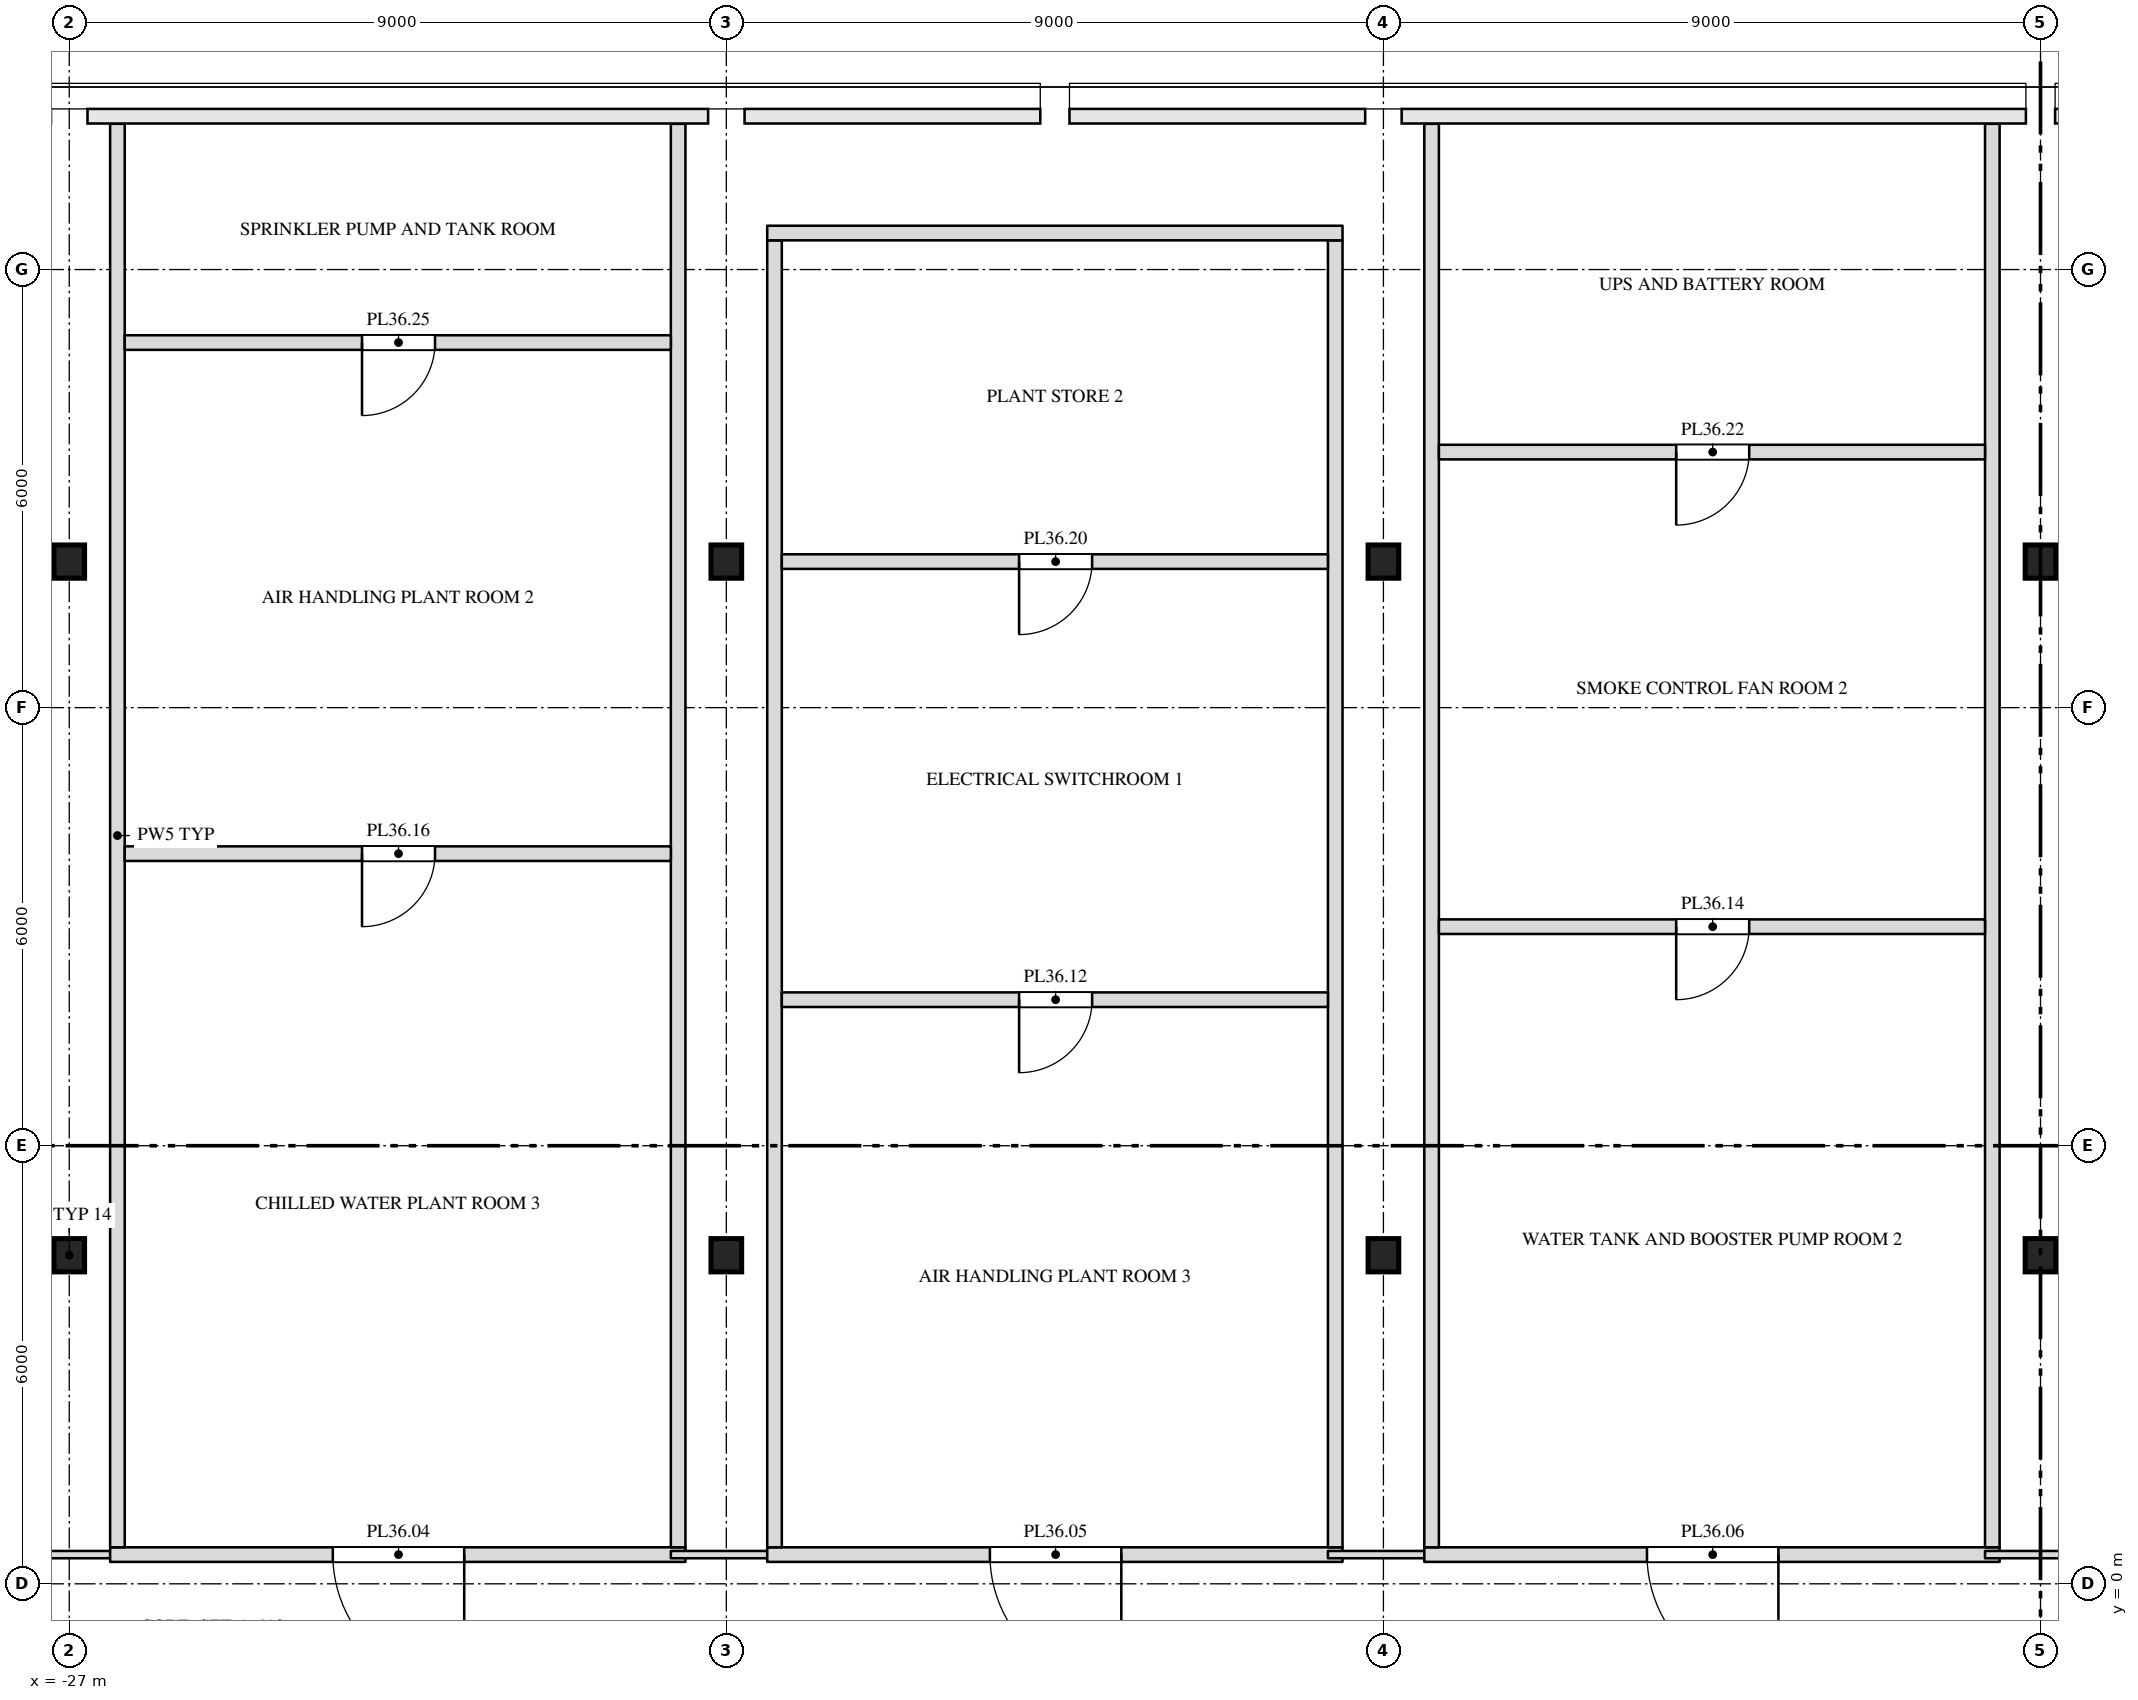
"""IFC4 building model, lengths in metres.
Left out: names, types, materials, properties, quantities, classifications, styles, units other than length and angle.
Written with IfcOpenShell. Run it as: python <this file> out.ifc"""

import sys

from ifc_helpers import new_model, si_unit, direction, frame, frame_2d, origin, origin_2d, place, context, subcontext, project, spatial, rectangle, i_section, extrude, element, fill, save


model = new_model("IFC4")
c1 = context("Model", 3, precision=1e-05, world=origin(), true_north=direction((0.0, 1.0)))
c2 = subcontext(c1, "Body", "Model", "MODEL_VIEW")
j1 = project(units=[si_unit("LENGTHUNIT", "METRE"), si_unit("PLANEANGLEUNIT", "RADIAN")], contexts=[c1])
p1 = place(None, origin())
s1 = spatial("IfcSite", under=j1, at=p1, CompositionType="ELEMENT")
p2 = place(p1, origin())
s2 = spatial("IfcBuilding", under=s1, at=p2, CompositionType="ELEMENT")
p3 = place(p2, frame((0.0, 0.0, 160.5)))
s3 = spatial("IfcBuildingStorey", under=s2, at=p3, CompositionType="ELEMENT", Elevation=160.5)
for number, where, z_axis, x_axis in (
    (1, (-27.0, 4.5, 0.0), (0.0, 0.0, 1.0), (1.0, 0.0, 0.0)),
    (2, (-18.0, 4.5, 0.0), (0.0, 0.0, 1.0), (1.0, 0.0, 0.0)),
    (3, (-9.0, 4.5, 0.0), (0.0, 0.0, 1.0), (1.0, 0.0, 0.0)),
    (4, (0.0, 4.5, 0.0), (0.0, 0.0, 1.0), (1.0, 0.0, 0.0)),
    (5, (-27.0, 14.0, 0.0), (0.0, 0.0, 1.0), (1.0, 0.0, 0.0)),
    (6, (-18.0, 14.0, 0.0), (0.0, 0.0, 1.0), (1.0, 0.0, 0.0)),
    (7, (-9.0, 14.0, 0.0), (0.0, 0.0, 1.0), (1.0, 0.0, 0.0)),
    (8, (0.0, 14.0, 0.0), (0.0, 0.0, 1.0), (1.0, 0.0, 0.0)),
):
    element("IfcColumn", number, at=place(p3, frame(where, z_axis=z_axis, x_axis=x_axis)), inside=s3, PredefinedType="COLUMN", context=c2, shape_type="SweptSolid", body=[
        extrude(i_section(OverallWidth=0.419, OverallDepth=0.455, WebThickness=0.042, FlangeThickness=0.068, at=origin_2d()), origin(), (0.0, 0.0, 1.0), 4.0),
    ])
p4 = place(p3, frame((-27.675, 0.4, 0.0), z_axis=(0.0, 0.0, 1.0), x_axis=(1.0, 0.0, 0.0)))
e9 = element("IfcWall", 9, at=p4, inside=s3, PredefinedType="PARTITIONING", context=c2, shape_type="SweptSolid", body=[
    extrude(rectangle(XDim=1.435, YDim=0.1, at=frame_2d((0.718, 0.0))), origin(), (0.0, 0.0, 1.0), 3.8),
])
p5 = place(p3, frame((-26.44, 0.4, 0.0), z_axis=(0.0, 0.0, 1.0), x_axis=(1.0, 0.0, 0.0)))
e10 = element("IfcWall", 10, at=p5, inside=s3, PredefinedType="PARTITIONING", context=c2, shape_type="SweptSolid", body=[
    extrude(rectangle(XDim=7.88, YDim=0.2, at=frame_2d((3.94, 0.0))), origin(), (0.0, 0.0, 1.0), 3.8),
])
p6 = place(p5, frame((3.05, 0.0, 0.0)))
e11 = element("IfcOpeningElement", 11, at=p6, cuts=e10, PredefinedType="OPENING", context=c2, shape_type="SweptSolid", body=[
    extrude(rectangle(XDim=1.8, YDim=2.1, at=frame_2d((0.9, 1.05))), frame((0.0, 0.112, 0.0), z_axis=(0.0, -1.0, 0.0), x_axis=(1.0, 0.0, 0.0)), (0.0, 0.0, 1.0), 0.224),
])
p7 = place(p3, frame((-26.34, 0.5, 0.0), z_axis=(0.0, 0.0, 1.0), x_axis=(0.0, 1.0, 0.0)))
e12 = element("IfcWall", 12, at=p7, inside=s3, PredefinedType="PARTITIONING", context=c2, shape_type="SweptSolid", body=[
    extrude(rectangle(XDim=19.496, YDim=0.2, at=frame_2d((9.748, 0.0))), origin(), (0.0, 0.0, 1.0), 3.8),
])
p8 = place(p3, frame((-18.76, 0.4, 0.0), z_axis=(0.0, 0.0, 1.0), x_axis=(1.0, 0.0, 0.0)))
e13 = element("IfcWall", 13, at=p8, inside=s3, PredefinedType="PARTITIONING", context=c2, shape_type="SweptSolid", body=[
    extrude(rectangle(XDim=1.52, YDim=0.1, at=frame_2d((0.76, 0.0))), origin(), (0.0, 0.0, 1.0), 3.8),
])
p9 = place(p3, frame((-18.66, 0.5, 0.0), z_axis=(0.0, 0.0, 1.0), x_axis=(0.0, 1.0, 0.0)))
e14 = element("IfcWall", 14, at=p9, inside=s3, PredefinedType="PARTITIONING", context=c2, shape_type="SweptSolid", body=[
    extrude(rectangle(XDim=19.496, YDim=0.2, at=frame_2d((9.748, 0.0))), origin(), (0.0, 0.0, 1.0), 3.8),
])
p10 = place(p3, frame((-17.44, 0.4, 0.0), z_axis=(0.0, 0.0, 1.0), x_axis=(1.0, 0.0, 0.0)))
e15 = element("IfcWall", 15, at=p10, inside=s3, PredefinedType="PARTITIONING", context=c2, shape_type="SweptSolid", body=[
    extrude(rectangle(XDim=7.88, YDim=0.2, at=frame_2d((3.94, 0.0))), origin(), (0.0, 0.0, 1.0), 3.8),
])
p11 = place(p10, frame((3.05, 0.0, 0.0)))
e16 = element("IfcOpeningElement", 16, at=p11, cuts=e15, PredefinedType="OPENING", context=c2, shape_type="SweptSolid", body=[
    extrude(rectangle(XDim=1.8, YDim=2.1, at=frame_2d((0.9, 1.05))), frame((0.0, 0.112, 0.0), z_axis=(0.0, -1.0, 0.0), x_axis=(1.0, 0.0, 0.0)), (0.0, 0.0, 1.0), 0.224),
])
p12 = place(p3, frame((-17.34, 0.5, 0.0), z_axis=(0.0, 0.0, 1.0), x_axis=(0.0, 1.0, 0.0)))
e17 = element("IfcWall", 17, at=p12, inside=s3, PredefinedType="PARTITIONING", context=c2, shape_type="SweptSolid", body=[
    extrude(rectangle(XDim=17.9, YDim=0.2, at=frame_2d((8.95, 0.0))), origin(), (0.0, 0.0, 1.0), 3.8),
])
p13 = place(p3, frame((-9.76, 0.4, 0.0), z_axis=(0.0, 0.0, 1.0), x_axis=(1.0, 0.0, 0.0)))
e18 = element("IfcWall", 18, at=p13, inside=s3, PredefinedType="PARTITIONING", context=c2, shape_type="SweptSolid", body=[
    extrude(rectangle(XDim=1.52, YDim=0.1, at=frame_2d((0.76, 0.0))), origin(), (0.0, 0.0, 1.0), 3.8),
])
p14 = place(p3, frame((-9.66, 0.5, 0.0), z_axis=(0.0, 0.0, 1.0), x_axis=(0.0, 1.0, 0.0)))
e19 = element("IfcWall", 19, at=p14, inside=s3, PredefinedType="PARTITIONING", context=c2, shape_type="SweptSolid", body=[
    extrude(rectangle(XDim=17.9, YDim=0.2, at=frame_2d((8.95, 0.0))), origin(), (0.0, 0.0, 1.0), 3.8),
])
p15 = place(p3, frame((-8.44, 0.4, 0.0), z_axis=(0.0, 0.0, 1.0), x_axis=(1.0, 0.0, 0.0)))
e20 = element("IfcWall", 20, at=p15, inside=s3, PredefinedType="PARTITIONING", context=c2, shape_type="SweptSolid", body=[
    extrude(rectangle(XDim=7.88, YDim=0.2, at=frame_2d((3.94, 0.0))), origin(), (0.0, 0.0, 1.0), 3.8),
])
p16 = place(p15, frame((3.05, 0.0, 0.0)))
e21 = element("IfcOpeningElement", 21, at=p16, cuts=e20, PredefinedType="OPENING", context=c2, shape_type="SweptSolid", body=[
    extrude(rectangle(XDim=1.8, YDim=2.1, at=frame_2d((0.9, 1.05))), frame((0.0, 0.112, 0.0), z_axis=(0.0, -1.0, 0.0), x_axis=(1.0, 0.0, 0.0)), (0.0, 0.0, 1.0), 0.224),
])
p17 = place(p3, frame((-8.34, 0.5, 0.0), z_axis=(0.0, 0.0, 1.0), x_axis=(0.0, 1.0, 0.0)))
e22 = element("IfcWall", 22, at=p17, inside=s3, PredefinedType="PARTITIONING", context=c2, shape_type="SweptSolid", body=[
    extrude(rectangle(XDim=19.496, YDim=0.2, at=frame_2d((9.748, 0.0))), origin(), (0.0, 0.0, 1.0), 3.8),
])
p18 = place(p3, frame((-0.76, 0.4, 0.0), z_axis=(0.0, 0.0, 1.0), x_axis=(1.0, 0.0, 0.0)))
e23 = element("IfcWall", 23, at=p18, inside=s3, PredefinedType="PARTITIONING", context=c2, shape_type="SweptSolid", body=[
    extrude(rectangle(XDim=1.52, YDim=0.1, at=frame_2d((0.76, 0.0))), origin(), (0.0, 0.0, 1.0), 3.8),
])
p19 = place(p3, frame((-0.66, 0.5, 0.0), z_axis=(0.0, 0.0, 1.0), x_axis=(0.0, 1.0, 0.0)))
e24 = element("IfcWall", 24, at=p19, inside=s3, PredefinedType="PARTITIONING", context=c2, shape_type="SweptSolid", body=[
    extrude(rectangle(XDim=19.496, YDim=0.2, at=frame_2d((9.748, 0.0))), origin(), (0.0, 0.0, 1.0), 3.8),
])
p20 = place(p3, frame((-17.24, 8.0, 0.0), z_axis=(0.0, 0.0, 1.0), x_axis=(1.0, 0.0, 0.0)))
e25 = element("IfcWall", 25, at=p20, inside=s3, PredefinedType="PARTITIONING", context=c2, shape_type="SweptSolid", body=[
    extrude(rectangle(XDim=7.48, YDim=0.2, at=frame_2d((3.74, 0.0))), origin(), (0.0, 0.0, 1.0), 3.8),
])
p21 = place(p20, frame((3.25, 0.0, 0.0)))
e26 = element("IfcOpeningElement", 26, at=p21, cuts=e25, PredefinedType="OPENING", context=c2, shape_type="SweptSolid", body=[
    extrude(rectangle(XDim=1.0, YDim=2.1, at=frame_2d((0.5, 1.05))), frame((0.0, 0.112, 0.0), z_axis=(0.0, -1.0, 0.0), x_axis=(1.0, 0.0, 0.0)), (0.0, 0.0, 1.0), 0.224),
])
p22 = place(p3, frame((-8.24, 9.0, 0.0), z_axis=(0.0, 0.0, 1.0), x_axis=(1.0, 0.0, 0.0)))
e27 = element("IfcWall", 27, at=p22, inside=s3, PredefinedType="PARTITIONING", context=c2, shape_type="SweptSolid", body=[
    extrude(rectangle(XDim=7.48, YDim=0.2, at=frame_2d((3.74, 0.0))), origin(), (0.0, 0.0, 1.0), 3.8),
])
p23 = place(p22, frame((3.25, 0.0, 0.0)))
e28 = element("IfcOpeningElement", 28, at=p23, cuts=e27, PredefinedType="OPENING", context=c2, shape_type="SweptSolid", body=[
    extrude(rectangle(XDim=1.0, YDim=2.1, at=frame_2d((0.5, 1.05))), frame((0.0, 0.112, 0.0), z_axis=(0.0, -1.0, 0.0), x_axis=(1.0, 0.0, 0.0)), (0.0, 0.0, 1.0), 0.224),
])
p24 = place(p3, frame((-26.24, 10.0, 0.0), z_axis=(0.0, 0.0, 1.0), x_axis=(1.0, 0.0, 0.0)))
e29 = element("IfcWall", 29, at=p24, inside=s3, PredefinedType="PARTITIONING", context=c2, shape_type="SweptSolid", body=[
    extrude(rectangle(XDim=7.48, YDim=0.2, at=frame_2d((3.74, 0.0))), origin(), (0.0, 0.0, 1.0), 3.8),
])
p25 = place(p24, frame((3.25, 0.0, 0.0)))
e30 = element("IfcOpeningElement", 30, at=p25, cuts=e29, PredefinedType="OPENING", context=c2, shape_type="SweptSolid", body=[
    extrude(rectangle(XDim=1.0, YDim=2.1, at=frame_2d((0.5, 1.05))), frame((0.0, 0.112, 0.0), z_axis=(0.0, -1.0, 0.0), x_axis=(1.0, 0.0, 0.0)), (0.0, 0.0, 1.0), 0.224),
])
p26 = place(p3, frame((-17.24, 14.0, 0.0), z_axis=(0.0, 0.0, 1.0), x_axis=(1.0, 0.0, 0.0)))
e31 = element("IfcWall", 31, at=p26, inside=s3, PredefinedType="PARTITIONING", context=c2, shape_type="SweptSolid", body=[
    extrude(rectangle(XDim=7.48, YDim=0.2, at=frame_2d((3.74, 0.0))), origin(), (0.0, 0.0, 1.0), 2.868),
])
p27 = place(p26, frame((3.25, 0.0, 0.0)))
e32 = element("IfcOpeningElement", 32, at=p27, cuts=e31, PredefinedType="OPENING", context=c2, shape_type="SweptSolid", body=[
    extrude(rectangle(XDim=1.0, YDim=2.1, at=frame_2d((0.5, 1.05))), frame((0.0, 0.112, 0.0), z_axis=(0.0, -1.0, 0.0), x_axis=(1.0, 0.0, 0.0)), (0.0, 0.0, 1.0), 0.224),
])
p28 = place(p3, frame((-8.24, 15.5, 0.0), z_axis=(0.0, 0.0, 1.0), x_axis=(1.0, 0.0, 0.0)))
e33 = element("IfcWall", 33, at=p28, inside=s3, PredefinedType="PARTITIONING", context=c2, shape_type="SweptSolid", body=[
    extrude(rectangle(XDim=7.48, YDim=0.2, at=frame_2d((3.74, 0.0))), origin(), (0.0, 0.0, 1.0), 3.8),
])
p29 = place(p28, frame((3.25, 0.0, 0.0)))
e34 = element("IfcOpeningElement", 34, at=p29, cuts=e33, PredefinedType="OPENING", context=c2, shape_type="SweptSolid", body=[
    extrude(rectangle(XDim=1.0, YDim=2.1, at=frame_2d((0.5, 1.05))), frame((0.0, 0.112, 0.0), z_axis=(0.0, -1.0, 0.0), x_axis=(1.0, 0.0, 0.0)), (0.0, 0.0, 1.0), 0.224),
])
p30 = place(p3, frame((-26.24, 17.0, 0.0), z_axis=(0.0, 0.0, 1.0), x_axis=(1.0, 0.0, 0.0)))
e35 = element("IfcWall", 35, at=p30, inside=s3, PredefinedType="PARTITIONING", context=c2, shape_type="SweptSolid", body=[
    extrude(rectangle(XDim=7.48, YDim=0.2, at=frame_2d((3.74, 0.0))), origin(), (0.0, 0.0, 1.0), 3.8),
])
p31 = place(p30, frame((3.25, 0.0, 0.0)))
e36 = element("IfcOpeningElement", 36, at=p31, cuts=e35, PredefinedType="OPENING", context=c2, shape_type="SweptSolid", body=[
    extrude(rectangle(XDim=1.0, YDim=2.1, at=frame_2d((0.5, 1.05))), frame((0.0, 0.112, 0.0), z_axis=(0.0, -1.0, 0.0), x_axis=(1.0, 0.0, 0.0)), (0.0, 0.0, 1.0), 0.224),
])
p32 = place(p3, frame((-17.44, 18.5, 0.0), z_axis=(0.0, 0.0, 1.0), x_axis=(1.0, 0.0, 0.0)))
e37 = element("IfcWall", 37, at=p32, inside=s3, PredefinedType="PARTITIONING", context=c2, shape_type="SweptSolid", body=[
    extrude(rectangle(XDim=7.88, YDim=0.2, at=frame_2d((3.94, 0.0))), origin(), (0.0, 0.0, 1.0), 3.8),
])
p33 = place(p6, origin())
e38 = element("IfcDoor", 38, at=p33, inside=s3, OperationType="DOUBLE_DOOR_SINGLE_SWING", PredefinedType="DOOR", context=c2, shape_type="SweptSolid", body=[
    extrude(rectangle(XDim=1.8, YDim=2.1, at=frame_2d((0.9, 1.05))), frame((0.0, 0.025, 0.0), z_axis=(0.0, -1.0, 0.0), x_axis=(1.0, 0.0, 0.0)), (0.0, 0.0, 1.0), 0.05),
])
fill(e11, e38)
p34 = place(p11, origin())
e39 = element("IfcDoor", 39, at=p34, inside=s3, OperationType="DOUBLE_DOOR_SINGLE_SWING", PredefinedType="DOOR", context=c2, shape_type="SweptSolid", body=[
    extrude(rectangle(XDim=1.8, YDim=2.1, at=frame_2d((0.9, 1.05))), frame((0.0, 0.025, 0.0), z_axis=(0.0, -1.0, 0.0), x_axis=(1.0, 0.0, 0.0)), (0.0, 0.0, 1.0), 0.05),
])
fill(e16, e39)
p35 = place(p16, origin())
e40 = element("IfcDoor", 40, at=p35, inside=s3, OperationType="DOUBLE_DOOR_SINGLE_SWING", PredefinedType="DOOR", context=c2, shape_type="SweptSolid", body=[
    extrude(rectangle(XDim=1.8, YDim=2.1, at=frame_2d((0.9, 1.05))), frame((0.0, 0.025, 0.0), z_axis=(0.0, -1.0, 0.0), x_axis=(1.0, 0.0, 0.0)), (0.0, 0.0, 1.0), 0.05),
])
fill(e21, e40)
p36 = place(p21, origin())
e41 = element("IfcDoor", 41, at=p36, inside=s3, OperationType="SINGLE_SWING_RIGHT", PredefinedType="DOOR", context=c2, shape_type="SweptSolid", body=[
    extrude(rectangle(XDim=1.0, YDim=2.1, at=frame_2d((0.5, 1.05))), frame((0.0, 0.025, 0.0), z_axis=(0.0, -1.0, 0.0), x_axis=(1.0, 0.0, 0.0)), (0.0, 0.0, 1.0), 0.05),
])
fill(e26, e41)
p37 = place(p23, origin())
e42 = element("IfcDoor", 42, at=p37, inside=s3, OperationType="SINGLE_SWING_RIGHT", PredefinedType="DOOR", context=c2, shape_type="SweptSolid", body=[
    extrude(rectangle(XDim=1.0, YDim=2.1, at=frame_2d((0.5, 1.05))), frame((0.0, 0.025, 0.0), z_axis=(0.0, -1.0, 0.0), x_axis=(1.0, 0.0, 0.0)), (0.0, 0.0, 1.0), 0.05),
])
fill(e28, e42)
p38 = place(p25, origin())
e43 = element("IfcDoor", 43, at=p38, inside=s3, OperationType="SINGLE_SWING_RIGHT", PredefinedType="DOOR", context=c2, shape_type="SweptSolid", body=[
    extrude(rectangle(XDim=1.0, YDim=2.1, at=frame_2d((0.5, 1.05))), frame((0.0, 0.025, 0.0), z_axis=(0.0, -1.0, 0.0), x_axis=(1.0, 0.0, 0.0)), (0.0, 0.0, 1.0), 0.05),
])
fill(e30, e43)
p39 = place(p27, origin())
e44 = element("IfcDoor", 44, at=p39, inside=s3, OperationType="SINGLE_SWING_RIGHT", PredefinedType="DOOR", context=c2, shape_type="SweptSolid", body=[
    extrude(rectangle(XDim=1.0, YDim=2.1, at=frame_2d((0.5, 1.05))), frame((0.0, 0.025, 0.0), z_axis=(0.0, -1.0, 0.0), x_axis=(1.0, 0.0, 0.0)), (0.0, 0.0, 1.0), 0.05),
])
fill(e32, e44)
p40 = place(p29, origin())
e45 = element("IfcDoor", 45, at=p40, inside=s3, OperationType="SINGLE_SWING_RIGHT", PredefinedType="DOOR", context=c2, shape_type="SweptSolid", body=[
    extrude(rectangle(XDim=1.0, YDim=2.1, at=frame_2d((0.5, 1.05))), frame((0.0, 0.025, 0.0), z_axis=(0.0, -1.0, 0.0), x_axis=(1.0, 0.0, 0.0)), (0.0, 0.0, 1.0), 0.05),
])
fill(e34, e45)
p41 = place(p31, origin())
e46 = element("IfcDoor", 46, at=p41, inside=s3, OperationType="SINGLE_SWING_RIGHT", PredefinedType="DOOR", context=c2, shape_type="SweptSolid", body=[
    extrude(rectangle(XDim=1.0, YDim=2.1, at=frame_2d((0.5, 1.05))), frame((0.0, 0.025, 0.0), z_axis=(0.0, -1.0, 0.0), x_axis=(1.0, 0.0, 0.0)), (0.0, 0.0, 1.0), 0.05),
])
fill(e36, e46)
save(model, sys.argv[1])
